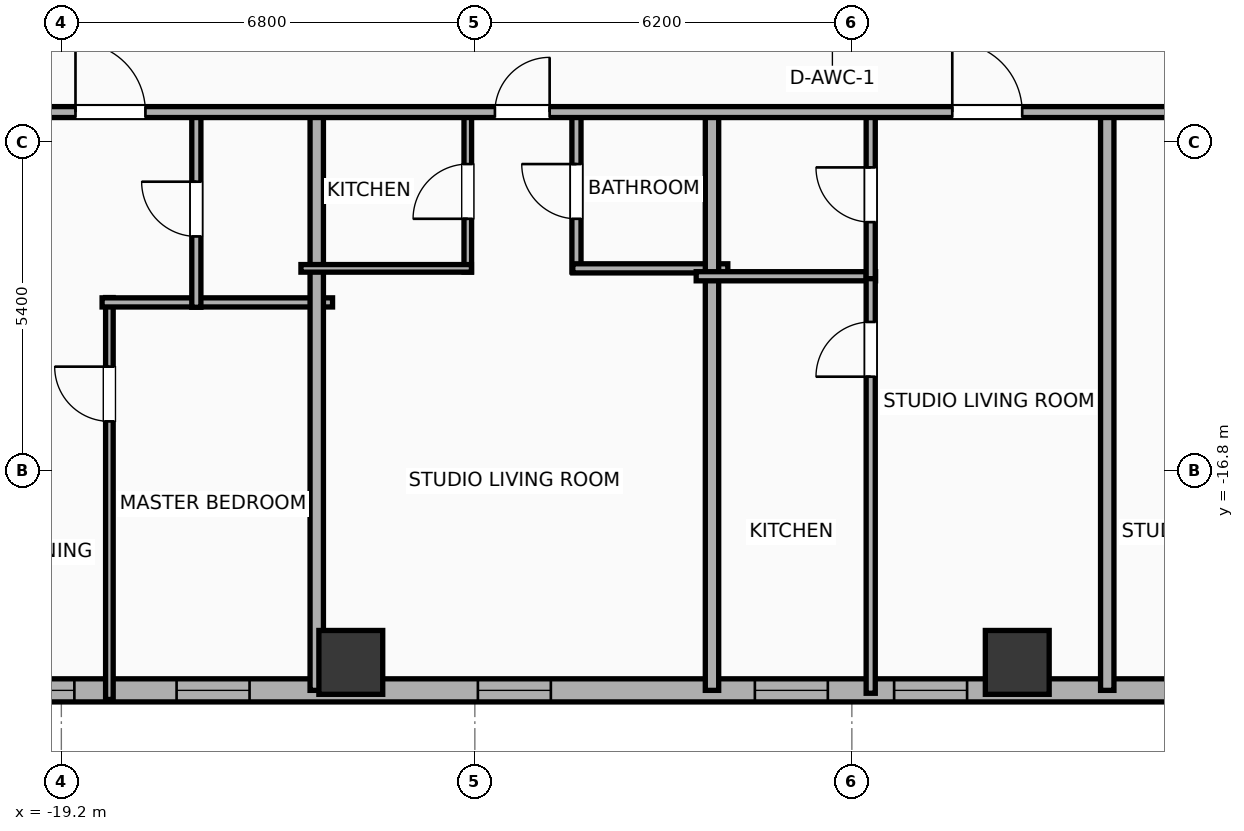
"""IFC4 building model, lengths in metres.
Left out: names, types, materials, properties, quantities, classifications, styles, units other than length and angle.
Written with IfcOpenShell. Run it as: python <this file> out.ifc"""

import sys

from ifc_helpers import new_model, si_unit, direction, frame, frame_2d, origin, origin_2d, place, context, subcontext, project, spatial, rectangle, hollow_rectangle, extrude, element, fill, save


model = new_model("IFC4")
c1 = context("Model", 3, precision=1e-05, world=origin(), true_north=direction((0.0, 1.0)))
c2 = subcontext(c1, "Body", "Model", "MODEL_VIEW")
j1 = project(units=[si_unit("LENGTHUNIT", "METRE"), si_unit("PLANEANGLEUNIT", "RADIAN")], contexts=[c1])
p1 = place(None, origin())
s1 = spatial("IfcSite", under=j1, at=p1, CompositionType="ELEMENT")
p2 = place(p1, origin())
s2 = spatial("IfcBuilding", under=s1, at=p2, CompositionType="ELEMENT")
p3 = place(p2, frame((0.0, 0.0, 89.7)))
s3 = spatial("IfcBuildingStorey", under=s2, at=p3, CompositionType="ELEMENT", Elevation=89.7)
for number, where, z_axis, x_axis in (
    (1, (-14.44, -19.95, 0.0), (0.0, 0.0, 1.0), (1.0, 0.0, 0.0)),
    (2, (-3.48, -19.95, 0.0), (0.0, 0.0, 1.0), (1.0, 0.0, 0.0)),
):
    element("IfcColumn", number, at=place(p3, frame(where, z_axis=z_axis, x_axis=x_axis)), inside=s3, PredefinedType="COLUMN", context=c2, shape_type="SweptSolid", body=[
        extrude(hollow_rectangle(XDim=1.05, YDim=1.05, WallThickness=0.036, at=origin_2d()), origin(), (0.0, 0.0, 1.0), 3.9),
    ])
p4 = place(p3, frame((29.381, -20.41, 0.0), z_axis=(0.0, 0.0, 1.0), x_axis=(-1.0, 0.0, 0.0)))
e3 = element("IfcWall", 3, at=p4, inside=s3, PredefinedType="ELEMENTEDWALL", context=c2, shape_type="SweptSolid", body=[
    extrude(rectangle(XDim=54.763, YDim=0.38, at=frame_2d((27.381, 0.0))), origin(), (0.0, 0.0, 1.0), 2.54),
])
p5 = place(p4, frame((48.367, 0.0, 0.75)))
e4 = element("IfcOpeningElement", 4, at=p5, cuts=e3, PredefinedType="OPENING", context=c2, shape_type="SweptSolid", body=[
    extrude(rectangle(XDim=2.4, YDim=1.63, at=frame_2d((1.2, 0.815))), frame((0.0, 0.2, 0.0), z_axis=(0.0, -1.0, 0.0), x_axis=(1.0, 0.0, 0.0)), (0.0, 0.0, 1.0), 0.4),
])
p6 = place(p4, frame((52.081, 0.0, 0.75)))
e5 = element("IfcOpeningElement", 5, at=p6, cuts=e3, PredefinedType="OPENING", context=c2, shape_type="SweptSolid", body=[
    extrude(rectangle(XDim=1.2, YDim=1.63, at=frame_2d((0.6, 0.815))), frame((0.0, 0.2, 0.0), z_axis=(0.0, -1.0, 0.0), x_axis=(1.0, 0.0, 0.0)), (0.0, 0.0, 1.0), 0.4),
])
p7 = place(p4, frame((45.486, 0.0, 0.75)))
e6 = element("IfcOpeningElement", 6, at=p7, cuts=e3, PredefinedType="OPENING", context=c2, shape_type="SweptSolid", body=[
    extrude(rectangle(XDim=1.2, YDim=1.63, at=frame_2d((0.6, 0.815))), frame((0.0, 0.2, 0.0), z_axis=(0.0, -1.0, 0.0), x_axis=(1.0, 0.0, 0.0)), (0.0, 0.0, 1.0), 0.4),
])
p8 = place(p4, frame((40.531, 0.0, 0.75)))
e7 = element("IfcOpeningElement", 7, at=p8, cuts=e3, PredefinedType="OPENING", context=c2, shape_type="SweptSolid", body=[
    extrude(rectangle(XDim=1.2, YDim=1.63, at=frame_2d((0.6, 0.815))), frame((0.0, 0.2, 0.0), z_axis=(0.0, -1.0, 0.0), x_axis=(1.0, 0.0, 0.0)), (0.0, 0.0, 1.0), 0.4),
])
p9 = place(p4, frame((33.686, 0.0, 0.75)))
e8 = element("IfcOpeningElement", 8, at=p9, cuts=e3, PredefinedType="OPENING", context=c2, shape_type="SweptSolid", body=[
    extrude(rectangle(XDim=1.2, YDim=1.63, at=frame_2d((0.6, 0.815))), frame((0.0, 0.2, 0.0), z_axis=(0.0, -1.0, 0.0), x_axis=(1.0, 0.0, 0.0)), (0.0, 0.0, 1.0), 0.4),
])
p10 = place(p4, frame((35.976, 0.0, 0.75)))
e9 = element("IfcOpeningElement", 9, at=p10, cuts=e3, PredefinedType="OPENING", context=c2, shape_type="SweptSolid", body=[
    extrude(rectangle(XDim=1.2, YDim=1.63, at=frame_2d((0.6, 0.815))), frame((0.0, 0.2, 0.0), z_axis=(0.0, -1.0, 0.0), x_axis=(1.0, 0.0, 0.0)), (0.0, 0.0, 1.0), 0.4),
])
p11 = place(p4, frame((28.805, 0.0, 0.75)))
e10 = element("IfcOpeningElement", 10, at=p11, cuts=e3, PredefinedType="OPENING", context=c2, shape_type="SweptSolid", body=[
    extrude(rectangle(XDim=1.2, YDim=1.63, at=frame_2d((0.6, 0.815))), frame((0.0, 0.2, 0.0), z_axis=(0.0, -1.0, 0.0), x_axis=(1.0, 0.0, 0.0)), (0.0, 0.0, 1.0), 0.4),
])
p12 = place(p4, frame((25.555, 0.0, 0.75)))
e11 = element("IfcOpeningElement", 11, at=p12, cuts=e3, PredefinedType="OPENING", context=c2, shape_type="SweptSolid", body=[
    extrude(rectangle(XDim=1.2, YDim=1.63, at=frame_2d((0.6, 0.815))), frame((0.0, 0.2, 0.0), z_axis=(0.0, -1.0, 0.0), x_axis=(1.0, 0.0, 0.0)), (0.0, 0.0, 1.0), 0.4),
])
p13 = place(p4, frame((19.951, 0.0, 0.75)))
e12 = element("IfcOpeningElement", 12, at=p13, cuts=e3, PredefinedType="OPENING", context=c2, shape_type="SweptSolid", body=[
    extrude(rectangle(XDim=1.2, YDim=1.63, at=frame_2d((0.6, 0.815))), frame((0.0, 0.2, 0.0), z_axis=(0.0, -1.0, 0.0), x_axis=(1.0, 0.0, 0.0)), (0.0, 0.0, 1.0), 0.4),
])
p14 = place(p4, frame((16.008, 0.0, 0.75)))
e13 = element("IfcOpeningElement", 13, at=p14, cuts=e3, PredefinedType="OPENING", context=c2, shape_type="SweptSolid", body=[
    extrude(rectangle(XDim=1.2, YDim=1.63, at=frame_2d((0.6, 0.815))), frame((0.0, 0.2, 0.0), z_axis=(0.0, -1.0, 0.0), x_axis=(1.0, 0.0, 0.0)), (0.0, 0.0, 1.0), 0.4),
])
p15 = place(p4, frame((13.008, 0.0, 0.75)))
e14 = element("IfcOpeningElement", 14, at=p15, cuts=e3, PredefinedType="OPENING", context=c2, shape_type="SweptSolid", body=[
    extrude(rectangle(XDim=1.2, YDim=1.63, at=frame_2d((0.6, 0.815))), frame((0.0, 0.2, 0.0), z_axis=(0.0, -1.0, 0.0), x_axis=(1.0, 0.0, 0.0)), (0.0, 0.0, 1.0), 0.4),
])
p16 = place(p4, frame((8.948, 0.0, 0.75)))
e15 = element("IfcOpeningElement", 15, at=p16, cuts=e3, PredefinedType="OPENING", context=c2, shape_type="SweptSolid", body=[
    extrude(rectangle(XDim=1.2, YDim=1.63, at=frame_2d((0.6, 0.815))), frame((0.0, 0.2, 0.0), z_axis=(0.0, -1.0, 0.0), x_axis=(1.0, 0.0, 0.0)), (0.0, 0.0, 1.0), 0.4),
])
p17 = place(p4, frame((6.908, 0.0, 0.75)))
e16 = element("IfcOpeningElement", 16, at=p17, cuts=e3, PredefinedType="OPENING", context=c2, shape_type="SweptSolid", body=[
    extrude(rectangle(XDim=1.2, YDim=1.63, at=frame_2d((0.6, 0.815))), frame((0.0, 0.2, 0.0), z_axis=(0.0, -1.0, 0.0), x_axis=(1.0, 0.0, 0.0)), (0.0, 0.0, 1.0), 0.4),
])
p18 = place(p4, frame((1.695, 0.0, 0.75)))
e17 = element("IfcOpeningElement", 17, at=p18, cuts=e3, PredefinedType="OPENING", context=c2, shape_type="SweptSolid", body=[
    extrude(rectangle(XDim=1.2, YDim=1.63, at=frame_2d((0.6, 0.815))), frame((0.0, 0.2, 0.0), z_axis=(0.0, -1.0, 0.0), x_axis=(1.0, 0.0, 0.0)), (0.0, 0.0, 1.0), 0.4),
])
p19 = place(p4, frame((4.441, 0.0, 0.75)))
e18 = element("IfcOpeningElement", 18, at=p19, cuts=e3, PredefinedType="OPENING", context=c2, shape_type="SweptSolid", body=[
    extrude(rectangle(XDim=1.2, YDim=1.63, at=frame_2d((0.6, 0.815))), frame((0.0, 0.2, 0.0), z_axis=(0.0, -1.0, 0.0), x_axis=(1.0, 0.0, 0.0)), (0.0, 0.0, 1.0), 0.4),
])
p20 = place(p3, frame((-18.41, -20.56, 0.0), z_axis=(0.0, 0.0, 1.0), x_axis=(0.0, 1.0, 0.0)))
e19 = element("IfcWall", 19, at=p20, inside=s3, PredefinedType="PARTITIONING", context=c2, shape_type="SweptSolid", body=[
    extrude(rectangle(XDim=6.61, YDim=0.125, at=frame_2d((3.305, 0.0))), origin(), (0.0, 0.0, 1.0), 3.65),
])
p21 = place(p20, frame((4.573, 0.0, 0.0)))
e20 = element("IfcOpeningElement", 20, at=p21, cuts=e19, PredefinedType="OPENING", context=c2, shape_type="SweptSolid", body=[
    extrude(rectangle(XDim=0.9, YDim=2.05, at=frame_2d((0.45, 1.025))), frame((0.0, 0.073, 0.0), z_axis=(0.0, -1.0, 0.0), x_axis=(1.0, 0.0, 0.0)), (0.0, 0.0, 1.0), 0.145),
])
p22 = place(p3, frame((-18.53, -14.03, 0.0), z_axis=(0.0, 0.0, 1.0), x_axis=(1.0, 0.0, 0.0)))
e21 = element("IfcWall", 21, at=p22, inside=s3, PredefinedType="PLUMBINGWALL", context=c2, shape_type="SweptSolid", body=[
    extrude(rectangle(XDim=3.79, YDim=0.15, at=frame_2d((1.895, 0.0))), origin(), (0.0, 0.0, 1.0), 3.65),
])
p23 = place(p3, frame((-16.98, -14.11, 0.0), z_axis=(0.0, 0.0, 1.0), x_axis=(0.0, 1.0, 0.0)))
e22 = element("IfcWall", 22, at=p23, inside=s3, PredefinedType="PLUMBINGWALL", context=c2, shape_type="SweptSolid", body=[
    extrude(rectangle(XDim=3.23, YDim=0.15, at=frame_2d((1.615, 0.0))), origin(), (0.0, 0.0, 1.0), 3.65),
])
p24 = place(p23, frame((1.165, 0.0, 0.0)))
e23 = element("IfcOpeningElement", 23, at=p24, cuts=e22, PredefinedType="OPENING", context=c2, shape_type="SweptSolid", body=[
    extrude(rectangle(XDim=0.9, YDim=2.05, at=frame_2d((0.45, 1.025))), frame((0.0, 0.085, 0.0), z_axis=(0.0, -1.0, 0.0), x_axis=(1.0, 0.0, 0.0)), (0.0, 0.0, 1.0), 0.17),
])
p25 = place(p3, frame((-15.0, -20.41, 0.0), z_axis=(0.0, 0.0, 1.0), x_axis=(0.0, 1.0, 0.0)))
e24 = element("IfcWall", 24, at=p25, inside=s3, PredefinedType="PARTITIONING", context=c2, shape_type="SweptSolid", body=[
    extrude(rectangle(XDim=9.59, YDim=0.22, at=frame_2d((4.795, 0.0))), origin(), (0.0, 0.0, 1.0), 2.54),
])
p26 = place(p3, frame((-12.516, -13.53, 0.0), z_axis=(0.0, 0.0, 1.0), x_axis=(0.0, 1.0, 0.0)))
e25 = element("IfcWall", 25, at=p26, inside=s3, PredefinedType="PARTITIONING", context=c2, shape_type="SweptSolid", body=[
    extrude(rectangle(XDim=2.65, YDim=0.125, at=frame_2d((1.325, 0.0))), origin(), (0.0, 0.0, 1.0), 3.65),
])
p27 = place(p26, frame((0.875, 0.0, 0.0)))
e26 = element("IfcOpeningElement", 26, at=p27, cuts=e25, PredefinedType="OPENING", context=c2, shape_type="SweptSolid", body=[
    extrude(rectangle(XDim=0.9, YDim=2.05, at=frame_2d((0.45, 1.025))), frame((0.0, 0.073, 0.0), z_axis=(0.0, -1.0, 0.0), x_axis=(1.0, 0.0, 0.0)), (0.0, 0.0, 1.0), 0.145),
])
p28 = place(p3, frame((-10.729, -13.53, 0.0), z_axis=(0.0, 0.0, 1.0), x_axis=(0.0, 1.0, 0.0)))
e27 = element("IfcWall", 27, at=p28, inside=s3, PredefinedType="PLUMBINGWALL", context=c2, shape_type="SweptSolid", body=[
    extrude(rectangle(XDim=2.65, YDim=0.15, at=frame_2d((1.325, 0.0))), origin(), (0.0, 0.0, 1.0), 3.65),
])
p29 = place(p28, frame((0.875, 0.0, 0.0)))
e28 = element("IfcOpeningElement", 28, at=p29, cuts=e27, PredefinedType="OPENING", context=c2, shape_type="SweptSolid", body=[
    extrude(rectangle(XDim=0.9, YDim=2.05, at=frame_2d((0.45, 1.025))), frame((0.0, 0.085, 0.0), z_axis=(0.0, -1.0, 0.0), x_axis=(1.0, 0.0, 0.0)), (0.0, 0.0, 1.0), 0.17),
])
p30 = place(p3, frame((-15.26, -13.47, 0.0), z_axis=(0.0, 0.0, 1.0), x_axis=(1.0, 0.0, 0.0)))
e29 = element("IfcWall", 29, at=p30, inside=s3, PredefinedType="PARTITIONING", context=c2, shape_type="SweptSolid", body=[
    extrude(rectangle(XDim=2.804, YDim=0.125, at=frame_2d((1.402, 0.0))), origin(), (0.0, 0.0, 1.0), 3.65),
])
p31 = place(p3, frame((-10.789, -13.47, 0.0), z_axis=(0.0, 0.0, 1.0), x_axis=(1.0, 0.0, 0.0)))
e30 = element("IfcWall", 30, at=p31, inside=s3, PredefinedType="PLUMBINGWALL", context=c2, shape_type="SweptSolid", body=[
    extrude(rectangle(XDim=2.549, YDim=0.15, at=frame_2d((1.274, 0.0))), origin(), (0.0, 0.0, 1.0), 3.65),
])
p32 = place(p3, frame((-8.5, -20.41, 0.0), z_axis=(0.0, 0.0, 1.0), x_axis=(0.0, 1.0, 0.0)))
e31 = element("IfcWall", 31, at=p32, inside=s3, PredefinedType="PARTITIONING", context=c2, shape_type="SweptSolid", body=[
    extrude(rectangle(XDim=9.59, YDim=0.22, at=frame_2d((4.795, 0.0))), origin(), (0.0, 0.0, 1.0), 3.65),
])
p33 = place(p3, frame((-8.76, -13.6, 0.0), z_axis=(0.0, 0.0, 1.0), x_axis=(1.0, 0.0, 0.0)))
e32 = element("IfcWall", 32, at=p33, inside=s3, PredefinedType="PLUMBINGWALL", context=c2, shape_type="SweptSolid", body=[
    extrude(rectangle(XDim=2.95, YDim=0.15, at=frame_2d((1.475, 0.0))), origin(), (0.0, 0.0, 1.0), 3.65),
])
p34 = place(p3, frame((-5.89, -20.458, 0.0), z_axis=(0.0, 0.0, 1.0), x_axis=(0.0, 1.0, 0.0)))
e33 = element("IfcWall", 33, at=p34, inside=s3, PredefinedType="PLUMBINGWALL", context=c2, shape_type="SweptSolid", body=[
    extrude(rectangle(XDim=6.897, YDim=0.15, at=frame_2d((3.449, 0.0))), origin(), (0.0, 0.0, 1.0), 3.65),
])
p35 = place(p34, frame((5.206, 0.0, 0.0)))
e34 = element("IfcOpeningElement", 34, at=p35, cuts=e33, PredefinedType="OPENING", context=c2, shape_type="SweptSolid", body=[
    extrude(rectangle(XDim=0.9, YDim=2.05, at=frame_2d((0.45, 1.025))), frame((0.0, 0.085, 0.0), z_axis=(0.0, -1.0, 0.0), x_axis=(1.0, 0.0, 0.0)), (0.0, 0.0, 1.0), 0.17),
])
p36 = place(p3, frame((-5.89, -13.64, 0.0), z_axis=(0.0, 0.0, 1.0), x_axis=(0.0, 1.0, 0.0)))
e35 = element("IfcWall", 35, at=p36, inside=s3, PredefinedType="PLUMBINGWALL", context=c2, shape_type="SweptSolid", body=[
    extrude(rectangle(XDim=2.76, YDim=0.15, at=frame_2d((1.38, 0.0))), origin(), (0.0, 0.0, 1.0), 3.65),
])
p37 = place(p36, frame((0.93, 0.0, 0.0)))
e36 = element("IfcOpeningElement", 36, at=p37, cuts=e35, PredefinedType="OPENING", context=c2, shape_type="SweptSolid", body=[
    extrude(rectangle(XDim=0.9, YDim=2.05, at=frame_2d((0.45, 1.025))), frame((0.0, 0.085, 0.0), z_axis=(0.0, -1.0, 0.0), x_axis=(1.0, 0.0, 0.0)), (0.0, 0.0, 1.0), 0.17),
])
p38 = place(p3, frame((-2.0, -20.41, 0.0), z_axis=(0.0, 0.0, 1.0), x_axis=(0.0, 1.0, 0.0)))
e37 = element("IfcWall", 37, at=p38, inside=s3, PredefinedType="PARTITIONING", context=c2, shape_type="SweptSolid", body=[
    extrude(rectangle(XDim=9.59, YDim=0.22, at=frame_2d((4.795, 0.0))), origin(), (0.0, 0.0, 1.0), 3.65),
])
p39 = place(p3, frame((-29.21, -10.9, 0.0), z_axis=(0.0, 0.0, 1.0), x_axis=(1.0, 0.0, 0.0)))
e38 = element("IfcWall", 38, at=p39, inside=s3, PredefinedType="PARTITIONING", context=c2, shape_type="SweptSolid", body=[
    extrude(rectangle(XDim=62.42, YDim=0.18, at=frame_2d((31.21, 0.0))), origin(), (0.0, 0.0, 1.0), 3.65),
])
p40 = place(p39, frame((3.108, 0.0, 0.0)))
e39 = element("IfcOpeningElement", 39, at=p40, cuts=e38, PredefinedType="OPENING", context=c2, shape_type="SweptSolid", body=[
    extrude(rectangle(XDim=1.15, YDim=2.05, at=frame_2d((0.575, 1.025))), frame((0.0, 0.1, 0.0), z_axis=(0.0, -1.0, 0.0), x_axis=(1.0, 0.0, 0.0)), (0.0, 0.0, 1.0), 0.2),
])
p41 = place(p39, frame((10.242, 0.0, 0.0)))
e40 = element("IfcOpeningElement", 40, at=p41, cuts=e38, PredefinedType="OPENING", context=c2, shape_type="SweptSolid", body=[
    extrude(rectangle(XDim=1.15, YDim=2.05, at=frame_2d((0.575, 1.025))), frame((0.0, 0.1, 0.0), z_axis=(0.0, -1.0, 0.0), x_axis=(1.0, 0.0, 0.0)), (0.0, 0.0, 1.0), 0.2),
])
p42 = place(p39, frame((17.14, 0.0, 0.0)))
e41 = element("IfcOpeningElement", 41, at=p42, cuts=e38, PredefinedType="OPENING", context=c2, shape_type="SweptSolid", body=[
    extrude(rectangle(XDim=0.9, YDim=2.05, at=frame_2d((0.45, 1.025))), frame((0.0, 0.1, 0.0), z_axis=(0.0, -1.0, 0.0), x_axis=(1.0, 0.0, 0.0)), (0.0, 0.0, 1.0), 0.2),
])
p43 = place(p39, frame((24.661, 0.0, 0.0)))
e42 = element("IfcOpeningElement", 42, at=p43, cuts=e38, PredefinedType="OPENING", context=c2, shape_type="SweptSolid", body=[
    extrude(rectangle(XDim=1.15, YDim=2.05, at=frame_2d((0.575, 1.025))), frame((0.0, 0.1, 0.0), z_axis=(0.0, -1.0, 0.0), x_axis=(1.0, 0.0, 0.0)), (0.0, 0.0, 1.0), 0.2),
])
p44 = place(p39, frame((28.644, 0.0, 0.0)))
e43 = element("IfcOpeningElement", 43, at=p44, cuts=e38, PredefinedType="OPENING", context=c2, shape_type="SweptSolid", body=[
    extrude(rectangle(XDim=1.15, YDim=2.05, at=frame_2d((0.575, 1.025))), frame((0.0, 0.1, 0.0), z_axis=(0.0, -1.0, 0.0), x_axis=(1.0, 0.0, 0.0)), (0.0, 0.0, 1.0), 0.2),
])
p45 = place(p39, frame((36.64, 0.0, 0.0)))
e44 = element("IfcOpeningElement", 44, at=p45, cuts=e38, PredefinedType="OPENING", context=c2, shape_type="SweptSolid", body=[
    extrude(rectangle(XDim=0.9, YDim=2.05, at=frame_2d((0.45, 1.025))), frame((0.0, 0.1, 0.0), z_axis=(0.0, -1.0, 0.0), x_axis=(1.0, 0.0, 0.0)), (0.0, 0.0, 1.0), 0.2),
])
p46 = place(p39, frame((41.44, 0.0, 0.0)))
e45 = element("IfcOpeningElement", 45, at=p46, cuts=e38, PredefinedType="OPENING", context=c2, shape_type="SweptSolid", body=[
    extrude(rectangle(XDim=1.15, YDim=2.05, at=frame_2d((0.575, 1.025))), frame((0.0, 0.1, 0.0), z_axis=(0.0, -1.0, 0.0), x_axis=(1.0, 0.0, 0.0)), (0.0, 0.0, 1.0), 0.2),
])
p47 = place(p39, frame((47.538, 0.0, 0.0)))
e46 = element("IfcOpeningElement", 46, at=p47, cuts=e38, PredefinedType="OPENING", context=c2, shape_type="SweptSolid", body=[
    extrude(rectangle(XDim=1.15, YDim=2.05, at=frame_2d((0.575, 1.025))), frame((0.0, 0.1, 0.0), z_axis=(0.0, -1.0, 0.0), x_axis=(1.0, 0.0, 0.0)), (0.0, 0.0, 1.0), 0.2),
])
p48 = place(p39, frame((57.157, 0.0, 0.0)))
e47 = element("IfcOpeningElement", 47, at=p48, cuts=e38, PredefinedType="OPENING", context=c2, shape_type="SweptSolid", body=[
    extrude(rectangle(XDim=1.15, YDim=2.05, at=frame_2d((0.575, 1.025))), frame((0.0, 0.1, 0.0), z_axis=(0.0, -1.0, 0.0), x_axis=(1.0, 0.0, 0.0)), (0.0, 0.0, 1.0), 0.2),
])
p49 = place(p5, origin())
e48 = element("IfcWindow", 48, at=p49, inside=s3, PartitioningType="SINGLE_PANEL", PredefinedType="WINDOW", context=c2, shape_type="SweptSolid", body=[
    extrude(rectangle(XDim=2.4, YDim=1.63, at=frame_2d((1.2, 0.815))), frame((0.0, 0.03, 0.0), z_axis=(0.0, -1.0, 0.0), x_axis=(1.0, 0.0, 0.0)), (0.0, 0.0, 1.0), 0.06),
])
fill(e4, e48)
p50 = place(p7, origin())
e49 = element("IfcWindow", 49, at=p50, inside=s3, PartitioningType="SINGLE_PANEL", PredefinedType="WINDOW", context=c2, shape_type="SweptSolid", body=[
    extrude(rectangle(XDim=1.2, YDim=1.63, at=frame_2d((0.6, 0.815))), frame((0.0, 0.03, 0.0), z_axis=(0.0, -1.0, 0.0), x_axis=(1.0, 0.0, 0.0)), (0.0, 0.0, 1.0), 0.06),
])
fill(e6, e49)
p51 = place(p8, origin())
e50 = element("IfcWindow", 50, at=p51, inside=s3, PartitioningType="SINGLE_PANEL", PredefinedType="WINDOW", context=c2, shape_type="SweptSolid", body=[
    extrude(rectangle(XDim=1.2, YDim=1.63, at=frame_2d((0.6, 0.815))), frame((0.0, 0.03, 0.0), z_axis=(0.0, -1.0, 0.0), x_axis=(1.0, 0.0, 0.0)), (0.0, 0.0, 1.0), 0.06),
])
fill(e7, e50)
p52 = place(p9, origin())
e51 = element("IfcWindow", 51, at=p52, inside=s3, PartitioningType="SINGLE_PANEL", PredefinedType="WINDOW", context=c2, shape_type="SweptSolid", body=[
    extrude(rectangle(XDim=1.2, YDim=1.63, at=frame_2d((0.6, 0.815))), frame((0.0, 0.03, 0.0), z_axis=(0.0, -1.0, 0.0), x_axis=(1.0, 0.0, 0.0)), (0.0, 0.0, 1.0), 0.06),
])
fill(e8, e51)
p53 = place(p10, origin())
e52 = element("IfcWindow", 52, at=p53, inside=s3, PartitioningType="SINGLE_PANEL", PredefinedType="WINDOW", context=c2, shape_type="SweptSolid", body=[
    extrude(rectangle(XDim=1.2, YDim=1.63, at=frame_2d((0.6, 0.815))), frame((0.0, 0.03, 0.0), z_axis=(0.0, -1.0, 0.0), x_axis=(1.0, 0.0, 0.0)), (0.0, 0.0, 1.0), 0.06),
])
fill(e9, e52)
p54 = place(p21, origin())
e53 = element("IfcDoor", 53, at=p54, inside=s3, OperationType="SINGLE_SWING_RIGHT", PredefinedType="DOOR", context=c2, shape_type="SweptSolid", body=[
    extrude(rectangle(XDim=0.9, YDim=2.05, at=frame_2d((0.45, 1.025))), frame((0.0, 0.025, 0.0), z_axis=(0.0, -1.0, 0.0), x_axis=(1.0, 0.0, 0.0)), (0.0, 0.0, 1.0), 0.05),
])
fill(e20, e53)
p55 = place(p24, origin())
e54 = element("IfcDoor", 54, at=p55, inside=s3, OperationType="SINGLE_SWING_RIGHT", PredefinedType="DOOR", context=c2, shape_type="SweptSolid", body=[
    extrude(rectangle(XDim=0.9, YDim=2.05, at=frame_2d((0.45, 1.025))), frame((0.0, 0.025, 0.0), z_axis=(0.0, -1.0, 0.0), x_axis=(1.0, 0.0, 0.0)), (0.0, 0.0, 1.0), 0.05),
])
fill(e23, e54)
p56 = place(p27, origin())
e55 = element("IfcDoor", 55, at=p56, inside=s3, OperationType="SINGLE_SWING_LEFT", PredefinedType="DOOR", context=c2, shape_type="SweptSolid", body=[
    extrude(rectangle(XDim=0.9, YDim=2.05, at=frame_2d((0.45, 1.025))), frame((0.0, 0.025, 0.0), z_axis=(0.0, -1.0, 0.0), x_axis=(1.0, 0.0, 0.0)), (0.0, 0.0, 1.0), 0.05),
])
fill(e26, e55)
p57 = place(p29, origin())
e56 = element("IfcDoor", 56, at=p57, inside=s3, OperationType="SINGLE_SWING_RIGHT", PredefinedType="DOOR", context=c2, shape_type="SweptSolid", body=[
    extrude(rectangle(XDim=0.9, YDim=2.05, at=frame_2d((0.45, 1.025))), frame((0.0, 0.025, 0.0), z_axis=(0.0, -1.0, 0.0), x_axis=(1.0, 0.0, 0.0)), (0.0, 0.0, 1.0), 0.05),
])
fill(e28, e56)
p58 = place(p35, origin())
e57 = element("IfcDoor", 57, at=p58, inside=s3, OperationType="SINGLE_SWING_LEFT", PredefinedType="DOOR", context=c2, shape_type="SweptSolid", body=[
    extrude(rectangle(XDim=0.9, YDim=2.05, at=frame_2d((0.45, 1.025))), frame((0.0, 0.025, 0.0), z_axis=(0.0, -1.0, 0.0), x_axis=(1.0, 0.0, 0.0)), (0.0, 0.0, 1.0), 0.05),
])
fill(e34, e57)
p59 = place(p37, origin())
e58 = element("IfcDoor", 58, at=p59, inside=s3, OperationType="SINGLE_SWING_RIGHT", PredefinedType="DOOR", context=c2, shape_type="SweptSolid", body=[
    extrude(rectangle(XDim=0.9, YDim=2.05, at=frame_2d((0.45, 1.025))), frame((0.0, 0.025, 0.0), z_axis=(0.0, -1.0, 0.0), x_axis=(1.0, 0.0, 0.0)), (0.0, 0.0, 1.0), 0.05),
])
fill(e36, e58)
p60 = place(p41, origin())
e59 = element("IfcDoor", 59, at=p60, inside=s3, OperationType="SINGLE_SWING_LEFT", PredefinedType="DOOR", context=c2, shape_type="SweptSolid", body=[
    extrude(rectangle(XDim=1.15, YDim=2.05, at=frame_2d((0.575, 1.025))), frame((0.0, 0.025, 0.0), z_axis=(0.0, -1.0, 0.0), x_axis=(1.0, 0.0, 0.0)), (0.0, 0.0, 1.0), 0.05),
])
fill(e40, e59)
p61 = place(p42, origin())
e60 = element("IfcDoor", 60, at=p61, inside=s3, OperationType="SINGLE_SWING_RIGHT", PredefinedType="DOOR", context=c2, shape_type="SweptSolid", body=[
    extrude(rectangle(XDim=0.9, YDim=2.05, at=frame_2d((0.45, 1.025))), frame((0.0, 0.025, 0.0), z_axis=(0.0, -1.0, 0.0), x_axis=(1.0, 0.0, 0.0)), (0.0, 0.0, 1.0), 0.05),
])
fill(e41, e60)
p62 = place(p43, origin())
e61 = element("IfcDoor", 61, at=p62, inside=s3, OperationType="SINGLE_SWING_LEFT", PredefinedType="DOOR", context=c2, shape_type="SweptSolid", body=[
    extrude(rectangle(XDim=1.15, YDim=2.05, at=frame_2d((0.575, 1.025))), frame((0.0, 0.025, 0.0), z_axis=(0.0, -1.0, 0.0), x_axis=(1.0, 0.0, 0.0)), (0.0, 0.0, 1.0), 0.05),
])
fill(e42, e61)
save(model, sys.argv[1])
